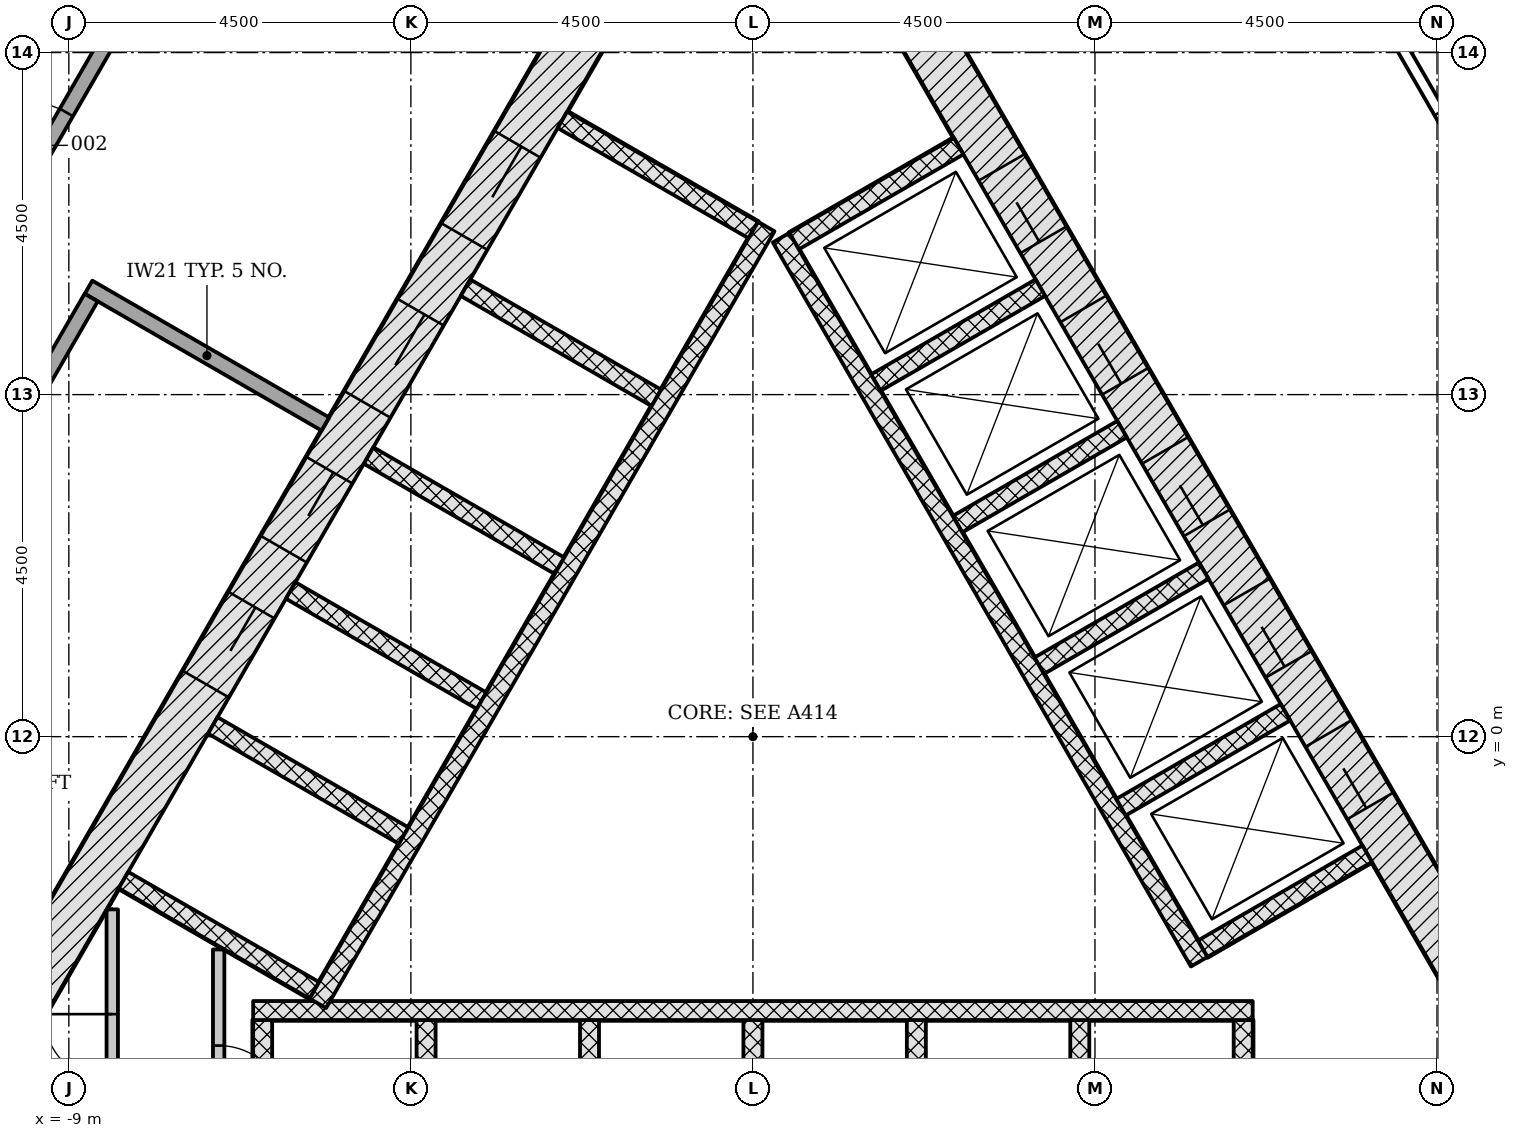
"""IFC4 building model, lengths in metres.
Left out: names, types, materials, properties, quantities, classifications, styles, units other than length and angle.
Written with IfcOpenShell. Run it as: python <this file> out.ifc"""

import sys

from ifc_helpers import new_model, si_unit, direction, frame, frame_2d, origin, place, context, subcontext, project, spatial, rectangle, extrude, element, fill, save


model = new_model("IFC4")
c1 = context("Model", 3, precision=1e-05, world=origin(), true_north=direction((0.0, 1.0)))
c2 = subcontext(c1, "Body", "Model", "MODEL_VIEW")
j1 = project(units=[si_unit("LENGTHUNIT", "METRE"), si_unit("PLANEANGLEUNIT", "RADIAN")], contexts=[c1])
p1 = place(None, origin())
s1 = spatial("IfcSite", under=j1, at=p1, CompositionType="ELEMENT")
p2 = place(p1, origin())
s2 = spatial("IfcBuilding", under=s1, at=p2, CompositionType="ELEMENT")
p3 = place(p2, frame((0.0, 0.0, 134.7)))
s3 = spatial("IfcBuildingStorey", under=s2, at=p3, CompositionType="ELEMENT", Elevation=134.7)
p4 = place(p3, frame((8.926, -6.753, -0.3), z_axis=(0.0, 0.0, 1.0), x_axis=(0.500042739161, 0.866000726912, 0.0)))
e1 = element("IfcWall", 1, at=p4, inside=s3, PredefinedType="SHEAR", context=c2, shape_type="SweptSolid", body=[
    extrude(rectangle(XDim=2.771, YDim=0.7, at=frame_2d((1.386, 0.0))), origin(), (0.0, 0.0, 1.0), 5.5),
])
p5 = place(p3, frame((10.311, -4.703, -0.3), z_axis=(0.0, 0.0, 1.0), x_axis=(-0.500001446645, 0.866024568562, 0.0)))
e2 = element("IfcWall", 2, at=p5, inside=s3, PredefinedType="SHEAR", context=c2, shape_type="SweptSolid", body=[
    extrude(rectangle(XDim=18.458, YDim=0.7, at=frame_2d((9.229, 0.0))), origin(), (0.0, 0.0, 1.0), 5.5),
])
p6 = place(p5, frame((4.379, 0.0, 0.3)))
e3 = element("IfcOpeningElement", 3, at=p6, cuts=e2, PredefinedType="OPENING", context=c2, shape_type="SweptSolid", body=[
    extrude(rectangle(XDim=1.1, YDim=2.1, at=frame_2d((0.55, 1.05))), frame((0.0, 0.36, 0.0), z_axis=(0.0, -1.0, 0.0), x_axis=(1.0, 0.0, 0.0)), (0.0, 0.0, 1.0), 0.72),
])
p7 = place(p5, frame((6.529, 0.0, 0.3)))
e4 = element("IfcOpeningElement", 4, at=p7, cuts=e2, PredefinedType="OPENING", context=c2, shape_type="SweptSolid", body=[
    extrude(rectangle(XDim=1.1, YDim=2.1, at=frame_2d((0.55, 1.05))), frame((0.0, 0.36, 0.0), z_axis=(0.0, -1.0, 0.0), x_axis=(1.0, 0.0, 0.0)), (0.0, 0.0, 1.0), 0.72),
])
p8 = place(p5, frame((8.679, 0.0, 0.3)))
e5 = element("IfcOpeningElement", 5, at=p8, cuts=e2, PredefinedType="OPENING", context=c2, shape_type="SweptSolid", body=[
    extrude(rectangle(XDim=1.1, YDim=2.1, at=frame_2d((0.55, 1.05))), frame((0.0, 0.36, 0.0), z_axis=(0.0, -1.0, 0.0), x_axis=(1.0, 0.0, 0.0)), (0.0, 0.0, 1.0), 0.72),
])
p9 = place(p5, frame((10.829, 0.0, 0.3)))
e6 = element("IfcOpeningElement", 6, at=p9, cuts=e2, PredefinedType="OPENING", context=c2, shape_type="SweptSolid", body=[
    extrude(rectangle(XDim=1.1, YDim=2.1, at=frame_2d((0.55, 1.05))), frame((0.0, 0.36, 0.0), z_axis=(0.0, -1.0, 0.0), x_axis=(1.0, 0.0, 0.0)), (0.0, 0.0, 1.0), 0.72),
])
p10 = place(p5, frame((12.979, 0.0, 0.3)))
e7 = element("IfcOpeningElement", 7, at=p10, cuts=e2, PredefinedType="OPENING", context=c2, shape_type="SweptSolid", body=[
    extrude(rectangle(XDim=1.1, YDim=2.1, at=frame_2d((0.55, 1.05))), frame((0.0, 0.36, 0.0), z_axis=(0.0, -1.0, 0.0), x_axis=(1.0, 0.0, 0.0)), (0.0, 0.0, 1.0), 0.72),
])
p11 = place(p3, frame((-1.083, 11.281, -0.3), z_axis=(0.0, 0.0, 1.0), x_axis=(-0.500001446645, -0.866024568562, 0.0)))
e8 = element("IfcWall", 8, at=p11, inside=s3, PredefinedType="SHEAR", context=c2, shape_type="SweptSolid", body=[
    extrude(rectangle(XDim=18.458, YDim=0.7, at=frame_2d((9.229, 0.0))), origin(), (0.0, 0.0, 1.0), 5.5),
])
p12 = place(p11, frame((4.029, 0.0, 0.3)))
e9 = element("IfcOpeningElement", 9, at=p12, cuts=e8, PredefinedType="OPENING", context=c2, shape_type="SweptSolid", body=[
    extrude(rectangle(XDim=1.4, YDim=2.1, at=frame_2d((0.7, 1.05))), frame((0.0, 0.36, 0.0), z_axis=(0.0, -1.0, 0.0), x_axis=(1.0, 0.0, 0.0)), (0.0, 0.0, 1.0), 0.72),
])
p13 = place(p11, frame((6.579, 0.0, 0.3)))
e10 = element("IfcOpeningElement", 10, at=p13, cuts=e8, PredefinedType="OPENING", context=c2, shape_type="SweptSolid", body=[
    extrude(rectangle(XDim=1.4, YDim=2.1, at=frame_2d((0.7, 1.05))), frame((0.0, 0.36, 0.0), z_axis=(0.0, -1.0, 0.0), x_axis=(1.0, 0.0, 0.0)), (0.0, 0.0, 1.0), 0.72),
])
p14 = place(p11, frame((8.979, 0.0, 0.3)))
e11 = element("IfcOpeningElement", 11, at=p14, cuts=e8, PredefinedType="OPENING", context=c2, shape_type="SweptSolid", body=[
    extrude(rectangle(XDim=1.2, YDim=2.1, at=frame_2d((0.6, 1.05))), frame((0.0, 0.36, 0.0), z_axis=(0.0, -1.0, 0.0), x_axis=(1.0, 0.0, 0.0)), (0.0, 0.0, 1.0), 0.72),
])
p15 = place(p11, frame((11.029, 0.0, 0.3)))
e12 = element("IfcOpeningElement", 12, at=p15, cuts=e8, PredefinedType="OPENING", context=c2, shape_type="SweptSolid", body=[
    extrude(rectangle(XDim=1.2, YDim=2.1, at=frame_2d((0.6, 1.05))), frame((0.0, 0.36, 0.0), z_axis=(0.0, -1.0, 0.0), x_axis=(1.0, 0.0, 0.0)), (0.0, 0.0, 1.0), 0.72),
])
p16 = place(p3, frame((-10.311, -4.353, -0.3), z_axis=(0.0, 0.0, 1.0), x_axis=(0.500042739161, -0.866000726912, 0.0)))
e13 = element("IfcWall", 13, at=p16, inside=s3, PredefinedType="SHEAR", context=c2, shape_type="SweptSolid", body=[
    extrude(rectangle(XDim=2.771, YDim=0.7, at=frame_2d((1.386, 0.0))), origin(), (0.0, 0.0, 1.0), 5.5),
])
for number, where, z_axis, x_axis in (
    (14, (-6.45, -6.228, -0.3), (0.0, 0.0, 1.0), (0.0, 1.0, 0.0)),
    (15, (-4.3, -6.228, -0.3), (0.0, 0.0, 1.0), (0.0, 1.0, 0.0)),
    (16, (-2.15, -6.228, -0.3), (0.0, 0.0, 1.0), (0.0, 1.0, 0.0)),
    (17, (0.0, -6.228, -0.3), (0.0, 0.0, 1.0), (0.0, 1.0, 0.0)),
    (18, (2.15, -6.228, -0.3), (0.0, 0.0, 1.0), (0.0, 1.0, 0.0)),
    (19, (4.3, -6.228, -0.3), (0.0, 0.0, 1.0), (0.0, 1.0, 0.0)),
    (20, (6.45, -6.228, -0.3), (0.0, 0.0, 1.0), (0.0, 1.0, 0.0)),
):
    element("IfcWall", number, at=place(p3, frame(where, z_axis=z_axis, x_axis=x_axis)), inside=s3, PredefinedType="PARTITIONING", context=c2, shape_type="SweptSolid", body=[
        extrude(rectangle(XDim=2.5, YDim=0.25, at=frame_2d((1.25, 0.0))), origin(), (0.0, 0.0, 1.0), 5.5),
    ])
p17 = place(p3, frame((-6.575, -3.603, 0.0), z_axis=(0.0, 0.0, 1.0), x_axis=(1.0, 0.0, 0.0)))
e21 = element("IfcWall", 21, at=p17, inside=s3, PredefinedType="PARTITIONING", context=c2, shape_type="SweptSolid", body=[
    extrude(rectangle(XDim=13.15, YDim=0.25, at=frame_2d((6.575, 0.0))), origin(), (0.0, 0.0, 1.0), 5.2),
])
for number, where, z_axis, x_axis in (
    (22, (8.081, -1.541, -0.3), (0.0, 0.0, 1.0), (-0.866, -0.5, 0.0)),
    (23, (7.006, 0.321, -0.3), (0.0, 0.0, 1.0), (-0.866, -0.5, 0.0)),
):
    element("IfcWall", number, at=place(p3, frame(where, z_axis=z_axis, x_axis=x_axis)), inside=s3, PredefinedType="PARTITIONING", context=c2, shape_type="SweptSolid", body=[
        extrude(rectangle(XDim=2.5, YDim=0.25, at=frame_2d((1.25, 0.0))), origin(), (0.0, 0.0, 1.0), 5.5),
    ])
p18 = place(p3, frame((5.931, 2.183, -0.3), z_axis=(0.0, 0.0, 1.0), x_axis=(-0.866047370643, -0.499961950354, 0.0)))
e24 = element("IfcWall", 24, at=p18, inside=s3, PredefinedType="PARTITIONING", context=c2, shape_type="SweptSolid", body=[
    extrude(rectangle(XDim=2.5, YDim=0.25, at=frame_2d((1.25, 0.0))), origin(), (0.0, 0.0, 1.0), 5.5),
])
for number, where, z_axis, x_axis in (
    (25, (4.856, 4.045, -0.3), (0.0, 0.0, 1.0), (-0.866, -0.5, 0.0)),
    (26, (3.781, 5.907, -0.3), (0.0, 0.0, 1.0), (-0.866, -0.5, 0.0)),
    (27, (2.706, 7.769, -0.3), (0.0, 0.0, 1.0), (-0.866, -0.5, 0.0)),
):
    element("IfcWall", number, at=place(p3, frame(where, z_axis=z_axis, x_axis=x_axis)), inside=s3, PredefinedType="PARTITIONING", context=c2, shape_type="SweptSolid", body=[
        extrude(rectangle(XDim=2.5, YDim=0.25, at=frame_2d((1.25, 0.0))), origin(), (0.0, 0.0, 1.0), 5.5),
    ])
p19 = place(p3, frame((5.87, -2.961, 0.0), z_axis=(0.0, 0.0, 1.0), x_axis=(-0.50000615651, 0.866021849293, 0.0)))
e28 = element("IfcWall", 28, at=p19, inside=s3, PredefinedType="PARTITIONING", context=c2, shape_type="SweptSolid", body=[
    extrude(rectangle(XDim=11.0, YDim=0.25, at=frame_2d((5.5, 0.0))), origin(), (0.0, 0.0, 1.0), 5.2),
])
p20 = place(p3, frame((-2.506, 8.115, -0.3), z_axis=(0.0, 0.0, 1.0), x_axis=(0.865996321171, -0.50005036918, 0.0)))
e29 = element("IfcWall", 29, at=p20, inside=s3, PredefinedType="PARTITIONING", context=c2, shape_type="SweptSolid", body=[
    extrude(rectangle(XDim=2.9, YDim=0.25, at=frame_2d((1.45, 0.0))), origin(), (0.0, 0.0, 1.0), 5.5),
])
for number, where, z_axis, x_axis in (
    (30, (-3.781, 5.907, -0.3), (0.0, 0.0, 1.0), (0.866, -0.5, 0.0)),
    (31, (-5.056, 3.699, -0.3), (0.0, 0.0, 1.0), (0.866, -0.5, 0.0)),
    (32, (-6.081, 1.923, -0.3), (0.0, 0.0, 1.0), (0.866, -0.5, 0.0)),
    (33, (-7.106, 0.148, -0.3), (0.0, 0.0, 1.0), (0.866, -0.5, 0.0)),
    (34, (-8.281, -1.887, -0.3), (0.0, 0.0, 1.0), (0.866, -0.5, 0.0)),
):
    element("IfcWall", number, at=place(p3, frame(where, z_axis=z_axis, x_axis=x_axis)), inside=s3, PredefinedType="PARTITIONING", context=c2, shape_type="SweptSolid", body=[
        extrude(rectangle(XDim=2.9, YDim=0.25, at=frame_2d((1.45, 0.0))), origin(), (0.0, 0.0, 1.0), 5.5),
    ])
p21 = place(p3, frame((0.176, 6.711, 0.0), z_axis=(0.0, 0.0, 1.0), x_axis=(-0.500004227369, -0.866022963098, 0.0)))
e35 = element("IfcWall", 35, at=p21, inside=s3, PredefinedType="PARTITIONING", context=c2, shape_type="SweptSolid", body=[
    extrude(rectangle(XDim=11.8, YDim=0.25, at=frame_2d((5.9, 0.0))), origin(), (0.0, 0.0, 1.0), 5.2),
])
p22 = place(p3, frame((-8.429, -5.928, 0.0), z_axis=(0.0, 0.0, 1.0), x_axis=(0.0, 1.0, 0.0)))
e36 = element("IfcWall", 36, at=p22, inside=s3, PredefinedType="PARTITIONING", context=c2, shape_type="SweptSolid", body=[
    extrude(rectangle(XDim=3.656, YDim=0.15, at=frame_2d((1.828, 0.0))), origin(), (0.0, 0.0, 1.0), 5.2),
])
p23 = place(p22, frame((1.378, 0.0, 0.0)))
e37 = element("IfcOpeningElement", 37, at=p23, cuts=e36, PredefinedType="OPENING", context=c2, shape_type="SweptSolid", body=[
    extrude(rectangle(XDim=0.9, YDim=2.1, at=frame_2d((0.45, 1.05))), frame((0.0, 0.085, 0.0), z_axis=(0.0, -1.0, 0.0), x_axis=(1.0, 0.0, 0.0)), (0.0, 0.0, 1.0), 0.17),
])
p24 = place(p3, frame((-7.029, -2.8, 0.0), z_axis=(0.0, 0.0, 1.0), x_axis=(0.0, -1.0, 0.0)))
e38 = element("IfcWall", 38, at=p24, inside=s3, PredefinedType="PARTITIONING", context=c2, shape_type="SweptSolid", body=[
    extrude(rectangle(XDim=3.428, YDim=0.15, at=frame_2d((1.714, 0.0))), origin(), (0.0, 0.0, 1.0), 5.2),
])
p25 = place(p24, frame((1.264, 0.0, 0.0)))
e39 = element("IfcOpeningElement", 39, at=p25, cuts=e38, PredefinedType="OPENING", context=c2, shape_type="SweptSolid", body=[
    extrude(rectangle(XDim=0.9, YDim=2.1, at=frame_2d((0.45, 1.05))), frame((0.0, 0.085, 0.0), z_axis=(0.0, -1.0, 0.0), x_axis=(1.0, 0.0, 0.0)), (0.0, 0.0, 1.0), 0.17),
])
p26 = place(p3, frame((-5.625, 4.114, 0.0), z_axis=(0.0, 0.0, 1.0), x_axis=(-0.866017220491, 0.500014173611, 0.0)))
e40 = element("IfcWall", 40, at=p26, inside=s3, PredefinedType="PARTITIONING", context=c2, shape_type="SweptSolid", body=[
    extrude(rectangle(XDim=3.598, YDim=0.2, at=frame_2d((1.799, 0.0))), origin(), (0.0, 0.0, 1.0), 5.2),
])
p27 = place(p3, frame((-12.658, -1.068, 0.0), z_axis=(0.0, 0.0, 1.0), x_axis=(0.499996073327, 0.866027670838, 0.0)))
e41 = element("IfcWall", 41, at=p27, inside=s3, PredefinedType="PARTITIONING", context=c2, shape_type="SweptSolid", body=[
    extrude(rectangle(XDim=7.904, YDim=0.2, at=frame_2d((3.952, 0.0))), origin(), (0.0, 0.0, 1.0), 4.647),
])
p28 = place(p27, frame((1.621, 0.0, 0.0)))
e42 = element("IfcOpeningElement", 42, at=p28, cuts=e41, PredefinedType="OPENING", context=c2, shape_type="SweptSolid", body=[
    extrude(rectangle(XDim=1.2, YDim=2.1, at=frame_2d((0.6, 1.05))), frame((0.0, 0.11, 0.0), z_axis=(0.0, -1.0, 0.0), x_axis=(1.0, 0.0, 0.0)), (0.0, 0.0, 1.0), 0.22),
])
p29 = place(p3, frame((-13.296, 0.827, 0.0), z_axis=(0.0, 0.0, 1.0), x_axis=(0.499999658466, 0.866025600969, 0.0)))
e43 = element("IfcWall", 43, at=p29, inside=s3, PredefinedType="PARTITIONING", context=c2, shape_type="SweptSolid", body=[
    extrude(rectangle(XDim=25.54, YDim=0.2, at=frame_2d((12.77, 0.0))), origin(), (0.0, 0.0, 1.0), 4.647),
])
p30 = place(p29, frame((17.363, 0.0, 0.0)))
e44 = element("IfcOpeningElement", 44, at=p30, cuts=e43, PredefinedType="OPENING", context=c2, shape_type="SweptSolid", body=[
    extrude(rectangle(XDim=1.0, YDim=2.1, at=frame_2d((0.5, 1.05))), frame((0.0, 0.11, 0.0), z_axis=(0.0, -1.0, 0.0), x_axis=(1.0, 0.0, 0.0)), (0.0, 0.0, 1.0), 0.22),
])
p31 = place(p29, frame((7.528, 0.0, 0.0)))
e45 = element("IfcOpeningElement", 45, at=p31, cuts=e43, PredefinedType="OPENING", context=c2, shape_type="SweptSolid", body=[
    extrude(rectangle(XDim=1.0, YDim=2.1, at=frame_2d((0.5, 1.05))), frame((0.0, 0.11, 0.0), z_axis=(0.0, -1.0, 0.0), x_axis=(1.0, 0.0, 0.0)), (0.0, 0.0, 1.0), 0.22),
])
p32 = place(p29, frame((3.132, 0.0, 0.0)))
e46 = element("IfcOpeningElement", 46, at=p32, cuts=e43, PredefinedType="OPENING", context=c2, shape_type="SweptSolid", body=[
    extrude(rectangle(XDim=1.2, YDim=2.1, at=frame_2d((0.6, 1.05))), frame((0.0, 0.11, 0.0), z_axis=(0.0, -1.0, 0.0), x_axis=(1.0, 0.0, 0.0)), (0.0, 0.0, 1.0), 0.22),
])
p33 = place(p3, frame((7.377, 11.079, 0.0), z_axis=(0.0, 0.0, 1.0), x_axis=(0.500006395474, -0.866021711325, 0.0)))
e47 = element("IfcWall", 47, at=p33, inside=s3, PredefinedType="PARTITIONING", context=c2, shape_type="SweptSolid", body=[
    extrude(rectangle(XDim=25.529, YDim=0.15, at=frame_2d((12.765, 0.0))), origin(), (0.0, 0.0, 1.0), 4.647),
])
p34 = place(p33, frame((17.541, 0.0, 0.0)))
e48 = element("IfcOpeningElement", 48, at=p34, cuts=e47, PredefinedType="OPENING", context=c2, shape_type="SweptSolid", body=[
    extrude(rectangle(XDim=1.0, YDim=2.1, at=frame_2d((0.5, 1.05))), frame((0.0, 0.085, 0.0), z_axis=(0.0, -1.0, 0.0), x_axis=(1.0, 0.0, 0.0)), (0.0, 0.0, 1.0), 0.17),
])
p35 = place(p33, frame((7.71, 0.0, 0.0)))
e49 = element("IfcOpeningElement", 49, at=p35, cuts=e47, PredefinedType="OPENING", context=c2, shape_type="SweptSolid", body=[
    extrude(rectangle(XDim=1.0, YDim=2.1, at=frame_2d((0.5, 1.05))), frame((0.0, 0.085, 0.0), z_axis=(0.0, -1.0, 0.0), x_axis=(1.0, 0.0, 0.0)), (0.0, 0.0, 1.0), 0.17),
])
p36 = place(p33, frame((3.311, 0.0, 0.0)))
e50 = element("IfcOpeningElement", 50, at=p36, cuts=e47, PredefinedType="OPENING", context=c2, shape_type="SweptSolid", body=[
    extrude(rectangle(XDim=1.0, YDim=2.1, at=frame_2d((0.5, 1.05))), frame((0.0, 0.085, 0.0), z_axis=(0.0, -1.0, 0.0), x_axis=(1.0, 0.0, 0.0)), (0.0, 0.0, 1.0), 0.17),
])
p37 = place(p6, origin())
e51 = element("IfcDoor", 51, at=p37, inside=s3, OperationType="DOUBLE_DOOR_SLIDING", PredefinedType="DOOR", context=c2, shape_type="SweptSolid", body=[
    extrude(rectangle(XDim=1.1, YDim=2.1, at=frame_2d((0.55, 1.05))), frame((0.0, 0.025, 0.0), z_axis=(0.0, -1.0, 0.0), x_axis=(1.0, 0.0, 0.0)), (0.0, 0.0, 1.0), 0.05),
])
fill(e3, e51)
p38 = place(p7, origin())
e52 = element("IfcDoor", 52, at=p38, inside=s3, OperationType="DOUBLE_DOOR_SLIDING", PredefinedType="DOOR", context=c2, shape_type="SweptSolid", body=[
    extrude(rectangle(XDim=1.1, YDim=2.1, at=frame_2d((0.55, 1.05))), frame((0.0, 0.025, 0.0), z_axis=(0.0, -1.0, 0.0), x_axis=(1.0, 0.0, 0.0)), (0.0, 0.0, 1.0), 0.05),
])
fill(e4, e52)
p39 = place(p8, origin())
e53 = element("IfcDoor", 53, at=p39, inside=s3, OperationType="DOUBLE_DOOR_SLIDING", PredefinedType="DOOR", context=c2, shape_type="SweptSolid", body=[
    extrude(rectangle(XDim=1.1, YDim=2.1, at=frame_2d((0.55, 1.05))), frame((0.0, 0.025, 0.0), z_axis=(0.0, -1.0, 0.0), x_axis=(1.0, 0.0, 0.0)), (0.0, 0.0, 1.0), 0.05),
])
fill(e5, e53)
p40 = place(p9, origin())
e54 = element("IfcDoor", 54, at=p40, inside=s3, OperationType="DOUBLE_DOOR_SLIDING", PredefinedType="DOOR", context=c2, shape_type="SweptSolid", body=[
    extrude(rectangle(XDim=1.1, YDim=2.1, at=frame_2d((0.55, 1.05))), frame((0.0, 0.025, 0.0), z_axis=(0.0, -1.0, 0.0), x_axis=(1.0, 0.0, 0.0)), (0.0, 0.0, 1.0), 0.05),
])
fill(e6, e54)
p41 = place(p10, origin())
e55 = element("IfcDoor", 55, at=p41, inside=s3, OperationType="DOUBLE_DOOR_SLIDING", PredefinedType="DOOR", context=c2, shape_type="SweptSolid", body=[
    extrude(rectangle(XDim=1.1, YDim=2.1, at=frame_2d((0.55, 1.05))), frame((0.0, 0.025, 0.0), z_axis=(0.0, -1.0, 0.0), x_axis=(1.0, 0.0, 0.0)), (0.0, 0.0, 1.0), 0.05),
])
fill(e7, e55)
p42 = place(p12, origin())
e56 = element("IfcDoor", 56, at=p42, inside=s3, OperationType="DOUBLE_DOOR_SLIDING", PredefinedType="DOOR", context=c2, shape_type="SweptSolid", body=[
    extrude(rectangle(XDim=1.4, YDim=2.1, at=frame_2d((0.7, 1.05))), frame((0.0, 0.025, 0.0), z_axis=(0.0, -1.0, 0.0), x_axis=(1.0, 0.0, 0.0)), (0.0, 0.0, 1.0), 0.05),
])
fill(e9, e56)
p43 = place(p13, origin())
e57 = element("IfcDoor", 57, at=p43, inside=s3, OperationType="DOUBLE_DOOR_SLIDING", PredefinedType="DOOR", context=c2, shape_type="SweptSolid", body=[
    extrude(rectangle(XDim=1.4, YDim=2.1, at=frame_2d((0.7, 1.05))), frame((0.0, 0.025, 0.0), z_axis=(0.0, -1.0, 0.0), x_axis=(1.0, 0.0, 0.0)), (0.0, 0.0, 1.0), 0.05),
])
fill(e10, e57)
p44 = place(p14, origin())
e58 = element("IfcDoor", 58, at=p44, inside=s3, OperationType="DOUBLE_DOOR_SLIDING", PredefinedType="DOOR", context=c2, shape_type="SweptSolid", body=[
    extrude(rectangle(XDim=1.2, YDim=2.1, at=frame_2d((0.6, 1.05))), frame((0.0, 0.025, 0.0), z_axis=(0.0, -1.0, 0.0), x_axis=(1.0, 0.0, 0.0)), (0.0, 0.0, 1.0), 0.05),
])
fill(e11, e58)
p45 = place(p15, origin())
e59 = element("IfcDoor", 59, at=p45, inside=s3, OperationType="DOUBLE_DOOR_SLIDING", PredefinedType="DOOR", context=c2, shape_type="SweptSolid", body=[
    extrude(rectangle(XDim=1.2, YDim=2.1, at=frame_2d((0.6, 1.05))), frame((0.0, 0.025, 0.0), z_axis=(0.0, -1.0, 0.0), x_axis=(1.0, 0.0, 0.0)), (0.0, 0.0, 1.0), 0.05),
])
fill(e12, e59)
p46 = place(p23, origin())
e60 = element("IfcDoor", 60, at=p46, inside=s3, OperationType="SINGLE_SWING_RIGHT", PredefinedType="DOOR", context=c2, shape_type="SweptSolid", body=[
    extrude(rectangle(XDim=0.9, YDim=2.1, at=frame_2d((0.45, 1.05))), frame((0.0, 0.025, 0.0), z_axis=(0.0, -1.0, 0.0), x_axis=(1.0, 0.0, 0.0)), (0.0, 0.0, 1.0), 0.05),
])
fill(e37, e60)
p47 = place(p25, origin())
e61 = element("IfcDoor", 61, at=p47, inside=s3, OperationType="SINGLE_SWING_RIGHT", PredefinedType="DOOR", context=c2, shape_type="SweptSolid", body=[
    extrude(rectangle(XDim=0.9, YDim=2.1, at=frame_2d((0.45, 1.05))), frame((0.0, 0.025, 0.0), z_axis=(0.0, -1.0, 0.0), x_axis=(1.0, 0.0, 0.0)), (0.0, 0.0, 1.0), 0.05),
])
fill(e39, e61)
p48 = place(p31, origin())
e62 = element("IfcDoor", 62, at=p48, inside=s3, OperationType="SINGLE_SWING_LEFT", PredefinedType="DOOR", context=c2, shape_type="SweptSolid", body=[
    extrude(rectangle(XDim=1.0, YDim=2.1, at=frame_2d((0.5, 1.05))), frame((0.0, 0.025, 0.0), z_axis=(0.0, -1.0, 0.0), x_axis=(1.0, 0.0, 0.0)), (0.0, 0.0, 1.0), 0.05),
])
fill(e45, e62)
p49 = place(p36, origin())
e63 = element("IfcDoor", 63, at=p49, inside=s3, OperationType="SINGLE_SWING_LEFT", PredefinedType="DOOR", context=c2, shape_type="SweptSolid", body=[
    extrude(rectangle(XDim=1.0, YDim=2.1, at=frame_2d((0.5, 1.05))), frame((0.0, 0.025, 0.0), z_axis=(0.0, -1.0, 0.0), x_axis=(1.0, 0.0, 0.0)), (0.0, 0.0, 1.0), 0.05),
])
fill(e50, e63)
save(model, sys.argv[1])
